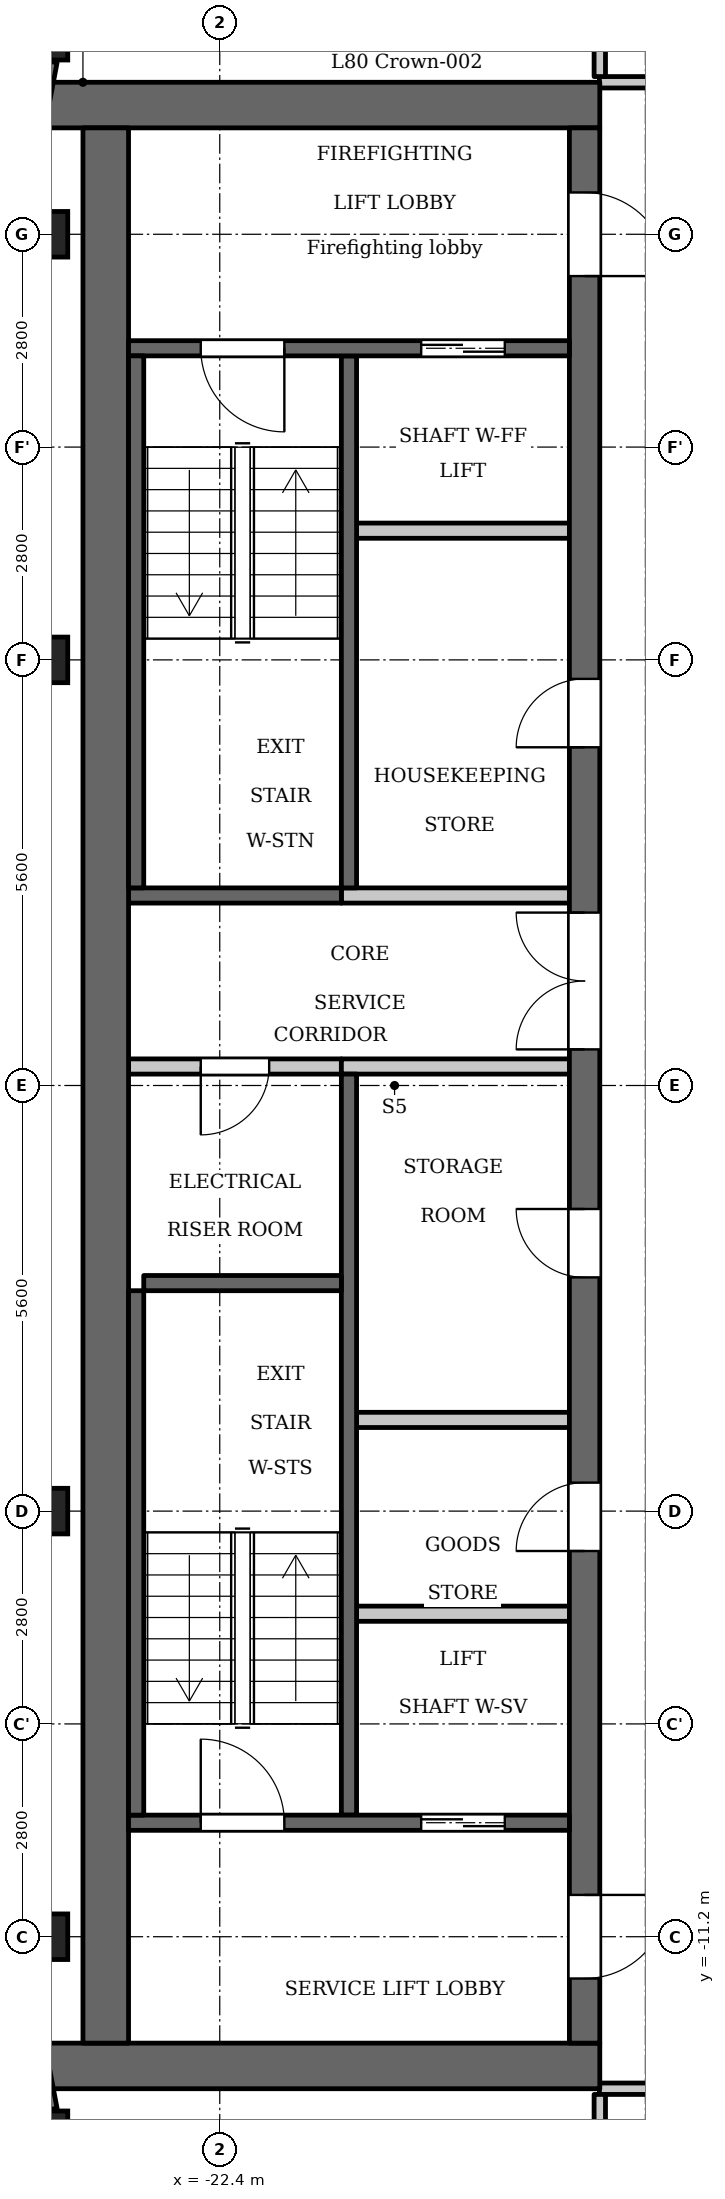
"""IFC4 building model, lengths in metres.
Left out: names, types, materials, properties, quantities, classifications, styles, units other than length and angle.
Written with IfcOpenShell. Run it as: python <this file> out.ifc"""

import sys

from ifc_helpers import new_model, si_unit, direction, frame, frame_2d, origin, origin_2d, place, context, subcontext, project, spatial, rectangle, extrude, element, fill, save


model = new_model("IFC4")
c1 = context("Model", 3, precision=1e-05, world=origin(), true_north=direction((0.0, 1.0)))
c2 = subcontext(c1, "Body", "Model", "MODEL_VIEW")
j1 = project(units=[si_unit("LENGTHUNIT", "METRE"), si_unit("PLANEANGLEUNIT", "RADIAN")], contexts=[c1])
p1 = place(None, origin())
s1 = spatial("IfcSite", under=j1, at=p1, CompositionType="ELEMENT")
p2 = place(p1, origin())
s2 = spatial("IfcBuilding", under=s1, at=p2, CompositionType="ELEMENT")
p3 = place(p2, frame((0.0, 0.0, 310.4)))
s3 = spatial("IfcBuildingStorey", under=s2, at=p3, CompositionType="ELEMENT", Elevation=310.4)
for number, where, z_axis, x_axis in (
    (1, (-24.7, -13.793, 0.0), (0.0, 0.0, 1.0), (1.0, 0.0, 0.0)),
    (2, (-24.7, -11.2, 0.0), (0.0, 0.0, 1.0), (1.0, 0.0, 0.0)),
    (3, (-24.7, -5.6, 0.0), (0.0, 0.0, 1.0), (1.0, 0.0, 0.0)),
    (4, (-24.7, 5.6, 0.0), (0.0, 0.0, 1.0), (1.0, 0.0, 0.0)),
    (5, (-24.7, 11.2, 0.0), (0.0, 0.0, 1.0), (1.0, 0.0, 0.0)),
    (6, (-24.7, 13.793, 0.0), (0.0, 0.0, 1.0), (1.0, 0.0, 0.0)),
):
    element("IfcColumn", number, at=place(p3, frame(where, z_axis=z_axis, x_axis=x_axis)), inside=s3, PredefinedType="COLUMN", context=c2, shape_type="SweptSolid", body=[
        extrude(rectangle(XDim=0.6, YDim=0.6, at=origin_2d()), origin(), (0.0, 0.0, 1.0), 3.5),
    ])
for number, where, z_axis, x_axis in (
    (7, (-24.688, 13.485, 0.0), (0.0, 0.0, 1.0), (-0.187, -0.982, 0.0)),
    (8, (-25.052, -11.573, 0.0), (0.0, 0.0, 1.0), (0.187, -0.982, 0.0)),
):
    element("IfcWall", number, at=place(p3, frame(where, z_axis=z_axis, x_axis=x_axis)), inside=s3, PredefinedType="SOLIDWALL", context=c2, shape_type="SweptSolid", body=[
        extrude(rectangle(XDim=1.947, YDim=0.3, at=frame_2d((0.973, 0.0))), origin(), (0.0, 0.0, 1.0), 2.2),
    ])
p4 = place(p3, frame((-20.7, 2.6, 0.0), z_axis=(0.0, 0.0, 1.0), x_axis=(0.0, 1.0, 0.0)))
e9 = element("IfcWall", 9, at=p4, inside=s3, PredefinedType="SHEAR", context=c2, shape_type="SweptSolid", body=[
    extrude(rectangle(XDim=7.0, YDim=0.2, at=frame_2d((3.5, 0.0))), origin(), (0.0, 0.0, 1.0), 2.8),
])
p5 = place(p3, frame((-20.7, -9.6, 0.0), z_axis=(0.0, 0.0, 1.0), x_axis=(0.0, 1.0, 0.0)))
e10 = element("IfcWall", 10, at=p5, inside=s3, PredefinedType="SHEAR", context=c2, shape_type="SweptSolid", body=[
    extrude(rectangle(XDim=9.75, YDim=0.2, at=frame_2d((4.875, 0.0))), origin(), (0.0, 0.0, 1.0), 2.8),
])
p6 = place(p3, frame((-20.8, 2.5, 0.0), z_axis=(0.0, 0.0, 1.0), x_axis=(-1.0, 0.0, 0.0)))
e11 = element("IfcWall", 11, at=p6, inside=s3, PredefinedType="SHEAR", context=c2, shape_type="SweptSolid", body=[
    extrude(rectangle(XDim=2.8, YDim=0.2, at=frame_2d((1.4, 0.0))), origin(), (0.0, 0.0, 1.0), 2.8),
])
p7 = place(p3, frame((-20.8, 0.25, 0.0), z_axis=(0.0, 0.0, 1.0), x_axis=(-1.0, 0.0, 0.0)))
e12 = element("IfcWall", 12, at=p7, inside=s3, PredefinedType="PARTITIONING", context=c2, shape_type="SweptSolid", body=[
    extrude(rectangle(XDim=2.8, YDim=0.2, at=frame_2d((1.4, 0.0))), origin(), (0.0, 0.0, 1.0), 2.8),
])
p8 = place(p7, frame((0.95, 0.0, 0.0)))
e13 = element("IfcOpeningElement", 13, at=p8, cuts=e12, PredefinedType="OPENING", context=c2, shape_type="SweptSolid", body=[
    extrude(rectangle(XDim=0.9, YDim=2.1, at=frame_2d((0.45, 1.05))), frame((0.0, 0.11, 0.0), z_axis=(0.0, -1.0, 0.0), x_axis=(1.0, 0.0, 0.0)), (0.0, 0.0, 1.0), 0.22),
])
for number, where, z_axis, x_axis in (
    (14, (-17.4, 12.9, 0.0), (0.0, 0.0, 1.0), (-1.0, 0.0, 0.0)),
    (15, (-17.4, -12.9, 0.0), (0.0, 0.0, 1.0), (-1.0, 0.0, 0.0)),
):
    element("IfcWall", number, at=place(p3, frame(where, z_axis=z_axis, x_axis=x_axis)), inside=s3, PredefinedType="SHEAR", context=c2, shape_type="SweptSolid", body=[
        extrude(rectangle(XDim=7.6, YDim=0.6, at=frame_2d((3.8, 0.0))), origin(), (0.0, 0.0, 1.0), 2.8),
    ])
p9 = place(p3, frame((-17.8, -4.4, 0.0), z_axis=(0.0, 0.0, 1.0), x_axis=(-1.0, 0.0, 0.0)))
e16 = element("IfcWall", 16, at=p9, inside=s3, PredefinedType="PARTITIONING", context=c2, shape_type="SweptSolid", body=[
    extrude(rectangle(XDim=2.8, YDim=0.2, at=frame_2d((1.4, 0.0))), origin(), (0.0, 0.0, 1.0), 2.8),
])
p10 = place(p3, frame((-17.6, -12.6, 0.0), z_axis=(0.0, 0.0, 1.0), x_axis=(0.0, 1.0, 0.0)))
e17 = element("IfcWall", 17, at=p10, inside=s3, PredefinedType="SHEAR", context=c2, shape_type="SweptSolid", body=[
    extrude(rectangle(XDim=25.2, YDim=0.4, at=frame_2d((12.6, 0.0))), origin(), (0.0, 0.0, 1.0), 2.8),
])
p11 = place(p10, frame((6.475, 0.0, 0.0)))
e18 = element("IfcOpeningElement", 18, at=p11, cuts=e17, PredefinedType="OPENING", context=c2, shape_type="SweptSolid", body=[
    extrude(rectangle(XDim=0.9, YDim=2.1, at=frame_2d((0.45, 1.05))), frame((0.0, 0.21, 0.0), z_axis=(0.0, -1.0, 0.0), x_axis=(1.0, 0.0, 0.0)), (0.0, 0.0, 1.0), 0.42),
])
p12 = place(p10, frame((10.075, 0.0, 0.0)))
e19 = element("IfcOpeningElement", 19, at=p12, cuts=e17, PredefinedType="OPENING", context=c2, shape_type="SweptSolid", body=[
    extrude(rectangle(XDim=0.9, YDim=2.1, at=frame_2d((0.45, 1.05))), frame((0.0, 0.21, 0.0), z_axis=(0.0, -1.0, 0.0), x_axis=(1.0, 0.0, 0.0)), (0.0, 0.0, 1.0), 0.42),
])
p13 = place(p10, frame((17.05, 0.0, 0.0)))
e20 = element("IfcOpeningElement", 20, at=p13, cuts=e17, PredefinedType="OPENING", context=c2, shape_type="SweptSolid", body=[
    extrude(rectangle(XDim=0.9, YDim=2.1, at=frame_2d((0.45, 1.05))), frame((0.0, 0.21, 0.0), z_axis=(0.0, -1.0, 0.0), x_axis=(1.0, 0.0, 0.0)), (0.0, 0.0, 1.0), 0.42),
])
p14 = place(p10, frame((23.25, 0.0, 0.0)))
e21 = element("IfcOpeningElement", 21, at=p14, cuts=e17, PredefinedType="OPENING", context=c2, shape_type="SweptSolid", body=[
    extrude(rectangle(XDim=1.1, YDim=2.1, at=frame_2d((0.55, 1.05))), frame((0.0, 0.21, 0.0), z_axis=(0.0, -1.0, 0.0), x_axis=(1.0, 0.0, 0.0)), (0.0, 0.0, 1.0), 0.42),
])
p15 = place(p10, frame((0.85, 0.0, 0.0)))
e22 = element("IfcOpeningElement", 22, at=p15, cuts=e17, PredefinedType="OPENING", context=c2, shape_type="SweptSolid", body=[
    extrude(rectangle(XDim=1.1, YDim=2.1, at=frame_2d((0.55, 1.05))), frame((0.0, 0.21, 0.0), z_axis=(0.0, -1.0, 0.0), x_axis=(1.0, 0.0, 0.0)), (0.0, 0.0, 1.0), 0.42),
])
p16 = place(p10, frame((13.075, 0.0, 0.0)))
e23 = element("IfcOpeningElement", 23, at=p16, cuts=e17, PredefinedType="OPENING", context=c2, shape_type="SweptSolid", body=[
    extrude(rectangle(XDim=1.8, YDim=2.1, at=frame_2d((0.9, 1.05))), frame((0.0, 0.21, 0.0), z_axis=(0.0, -1.0, 0.0), x_axis=(1.0, 0.0, 0.0)), (0.0, 0.0, 1.0), 0.42),
])
p17 = place(p3, frame((-23.9, -12.6, 0.0), z_axis=(0.0, 0.0, 1.0), x_axis=(0.0, 1.0, 0.0)))
e24 = element("IfcWall", 24, at=p17, inside=s3, PredefinedType="SHEAR", context=c2, shape_type="SweptSolid", body=[
    extrude(rectangle(XDim=25.2, YDim=0.6, at=frame_2d((12.6, 0.0))), origin(), (0.0, 0.0, 1.0), 2.8),
])
p18 = place(p3, frame((-17.8, -9.7, 0.0), z_axis=(0.0, 0.0, 1.0), x_axis=(-1.0, 0.0, 0.0)))
e25 = element("IfcWall", 25, at=p18, inside=s3, PredefinedType="SHEAR", context=c2, shape_type="SweptSolid", body=[
    extrude(rectangle(XDim=5.8, YDim=0.2, at=frame_2d((2.9, 0.0))), origin(), (0.0, 0.0, 1.0), 2.8),
])
p19 = place(p18, frame((0.85, 0.0, 0.0)))
e26 = element("IfcOpeningElement", 26, at=p19, cuts=e25, PredefinedType="OPENING", context=c2, shape_type="SweptSolid", body=[
    extrude(rectangle(XDim=1.1, YDim=2.1, at=frame_2d((0.55, 1.05))), frame((0.0, 0.11, 0.0), z_axis=(0.0, -1.0, 0.0), x_axis=(1.0, 0.0, 0.0)), (0.0, 0.0, 1.0), 0.22),
])
p20 = place(p18, frame((3.75, 0.0, 0.0)))
e27 = element("IfcOpeningElement", 27, at=p20, cuts=e25, PredefinedType="OPENING", context=c2, shape_type="SweptSolid", body=[
    extrude(rectangle(XDim=1.1, YDim=2.1, at=frame_2d((0.55, 1.05))), frame((0.0, 0.11, 0.0), z_axis=(0.0, -1.0, 0.0), x_axis=(1.0, 0.0, 0.0)), (0.0, 0.0, 1.0), 0.22),
])
p21 = place(p3, frame((-17.8, -6.95, 0.0), z_axis=(0.0, 0.0, 1.0), x_axis=(-1.0, 0.0, 0.0)))
e28 = element("IfcWall", 28, at=p21, inside=s3, PredefinedType="PARTITIONING", context=c2, shape_type="SweptSolid", body=[
    extrude(rectangle(XDim=2.8, YDim=0.2, at=frame_2d((1.4, 0.0))), origin(), (0.0, 0.0, 1.0), 2.8),
])
for number, where, z_axis, x_axis in (
    (29, (-17.8, 0.25, 0.0), (0.0, 0.0, 1.0), (-1.0, 0.0, 0.0)),
    (30, (-17.8, 2.5, 0.0), (0.0, 0.0, 1.0), (-1.0, 0.0, 0.0)),
):
    element("IfcWall", number, at=place(p3, frame(where, z_axis=z_axis, x_axis=x_axis)), inside=s3, PredefinedType="PARTITIONING", context=c2, shape_type="SweptSolid", body=[
        extrude(rectangle(XDim=3.0, YDim=0.2, at=frame_2d((1.5, 0.0))), origin(), (0.0, 0.0, 1.0), 2.8),
    ])
p22 = place(p3, frame((-17.8, 7.3, 0.0), z_axis=(0.0, 0.0, 1.0), x_axis=(-1.0, 0.0, 0.0)))
e31 = element("IfcWall", 31, at=p22, inside=s3, PredefinedType="PARTITIONING", context=c2, shape_type="SweptSolid", body=[
    extrude(rectangle(XDim=2.8, YDim=0.2, at=frame_2d((1.4, 0.0))), origin(), (0.0, 0.0, 1.0), 2.8),
])
p23 = place(p3, frame((-17.8, 9.7, 0.0), z_axis=(0.0, 0.0, 1.0), x_axis=(-1.0, 0.0, 0.0)))
e32 = element("IfcWall", 32, at=p23, inside=s3, PredefinedType="SHEAR", context=c2, shape_type="SweptSolid", body=[
    extrude(rectangle(XDim=5.8, YDim=0.2, at=frame_2d((2.9, 0.0))), origin(), (0.0, 0.0, 1.0), 2.8),
])
p24 = place(p23, frame((0.85, 0.0, 0.0)))
e33 = element("IfcOpeningElement", 33, at=p24, cuts=e32, PredefinedType="OPENING", context=c2, shape_type="SweptSolid", body=[
    extrude(rectangle(XDim=1.1, YDim=2.1, at=frame_2d((0.55, 1.05))), frame((0.0, 0.11, 0.0), z_axis=(0.0, -1.0, 0.0), x_axis=(1.0, 0.0, 0.0)), (0.0, 0.0, 1.0), 0.22),
])
p25 = place(p23, frame((3.75, 0.0, 0.0)))
e34 = element("IfcOpeningElement", 34, at=p25, cuts=e32, PredefinedType="OPENING", context=c2, shape_type="SweptSolid", body=[
    extrude(rectangle(XDim=1.1, YDim=2.1, at=frame_2d((0.55, 1.05))), frame((0.0, 0.11, 0.0), z_axis=(0.0, -1.0, 0.0), x_axis=(1.0, 0.0, 0.0)), (0.0, 0.0, 1.0), 0.22),
])
p26 = place(p3, frame((-23.5, 2.6, 0.0), z_axis=(0.0, 0.0, 1.0), x_axis=(0.0, 1.0, 0.0)))
e35 = element("IfcWall", 35, at=p26, inside=s3, PredefinedType="SHEAR", context=c2, shape_type="SweptSolid", body=[
    extrude(rectangle(XDim=7.0, YDim=0.2, at=frame_2d((3.5, 0.0))), origin(), (0.0, 0.0, 1.0), 2.8),
])
p27 = place(p3, frame((-23.5, -9.6, 0.0), z_axis=(0.0, 0.0, 1.0), x_axis=(0.0, 1.0, 0.0)))
e36 = element("IfcWall", 36, at=p27, inside=s3, PredefinedType="SHEAR", context=c2, shape_type="SweptSolid", body=[
    extrude(rectangle(XDim=6.9, YDim=0.2, at=frame_2d((3.45, 0.0))), origin(), (0.0, 0.0, 1.0), 2.8),
])
p28 = place(p3, frame((-20.8, -2.6, 0.0), z_axis=(0.0, 0.0, 1.0), x_axis=(-1.0, 0.0, 0.0)))
e37 = element("IfcWall", 37, at=p28, inside=s3, PredefinedType="SHEAR", context=c2, shape_type="SweptSolid", body=[
    extrude(rectangle(XDim=2.6, YDim=0.2, at=frame_2d((1.3, 0.0))), origin(), (0.0, 0.0, 1.0), 2.8),
])
p29 = place(p3, frame((-17.405, -13.2, 0.0), z_axis=(0.0, 0.0, 1.0), x_axis=(1.0, 0.0, 0.0)))
e38 = element("IfcWall", 38, at=p29, inside=s3, PredefinedType="PARTITIONING", context=c2, shape_type="SweptSolid", body=[
    extrude(rectangle(XDim=2.085, YDim=0.15, at=frame_2d((1.042, 0.0))), origin(), (0.0, 0.0, 1.0), 2.8),
])
p30 = place(p29, frame((0.655, 0.0, 0.0)))
e39 = element("IfcOpeningElement", 39, at=p30, cuts=e38, PredefinedType="OPENING", context=c2, shape_type="SweptSolid", body=[
    extrude(rectangle(XDim=1.0, YDim=2.1, at=frame_2d((0.5, 1.05))), frame((0.0, 0.085, 0.0), z_axis=(0.0, -1.0, 0.0), x_axis=(1.0, 0.0, 0.0)), (0.0, 0.0, 1.0), 0.17),
])
p31 = place(p3, frame((-17.405, 13.2, 0.0), z_axis=(0.0, 0.0, 1.0), x_axis=(1.0, 0.0, 0.0)))
e40 = element("IfcWall", 40, at=p31, inside=s3, PredefinedType="PARTITIONING", context=c2, shape_type="SweptSolid", body=[
    extrude(rectangle(XDim=2.085, YDim=0.15, at=frame_2d((1.042, 0.0))), origin(), (0.0, 0.0, 1.0), 2.8),
])
p32 = place(p31, frame((0.665, 0.0, 0.0)))
e41 = element("IfcOpeningElement", 41, at=p32, cuts=e40, PredefinedType="OPENING", context=c2, shape_type="SweptSolid", body=[
    extrude(rectangle(XDim=1.0, YDim=2.1, at=frame_2d((0.5, 1.05))), frame((0.0, 0.085, 0.0), z_axis=(0.0, -1.0, 0.0), x_axis=(1.0, 0.0, 0.0)), (0.0, 0.0, 1.0), 0.17),
])
p33 = place(p3, frame((-17.4, -19.236, 0.0), z_axis=(0.0, 0.0, 1.0), x_axis=(0.0, 1.0, 0.0)))
e42 = element("IfcWall", 42, at=p33, inside=s3, PredefinedType="PARTITIONING", context=c2, shape_type="SweptSolid", body=[
    extrude(rectangle(XDim=5.961, YDim=0.15, at=frame_2d((2.981, 0.0))), origin(), (0.0, 0.0, 1.0), 2.8),
])
p34 = place(p33, frame((0.486, 0.0, 0.0)))
e43 = element("IfcOpeningElement", 43, at=p34, cuts=e42, PredefinedType="OPENING", context=c2, shape_type="SweptSolid", body=[
    extrude(rectangle(XDim=0.9, YDim=2.1, at=frame_2d((0.45, 1.05))), frame((0.0, 0.085, 0.0), z_axis=(0.0, -1.0, 0.0), x_axis=(1.0, 0.0, 0.0)), (0.0, 0.0, 1.0), 0.17),
])
p35 = place(p3, frame((-17.4, 13.275, 0.0), z_axis=(0.0, 0.0, 1.0), x_axis=(0.0, 1.0, 0.0)))
e44 = element("IfcWall", 44, at=p35, inside=s3, PredefinedType="PARTITIONING", context=c2, shape_type="SweptSolid", body=[
    extrude(rectangle(XDim=5.961, YDim=0.15, at=frame_2d((2.981, 0.0))), origin(), (0.0, 0.0, 1.0), 2.8),
])
p36 = place(p35, frame((1.145, 0.0, 0.0)))
e45 = element("IfcOpeningElement", 45, at=p36, cuts=e44, PredefinedType="OPENING", context=c2, shape_type="SweptSolid", body=[
    extrude(rectangle(XDim=0.9, YDim=2.1, at=frame_2d((0.45, 1.05))), frame((0.0, 0.085, 0.0), z_axis=(0.0, -1.0, 0.0), x_axis=(1.0, 0.0, 0.0)), (0.0, 0.0, 1.0), 0.17),
])
p37 = place(p19, origin())
e46 = element("IfcDoor", 46, at=p37, inside=s3, OperationType="DOUBLE_DOOR_SLIDING", PredefinedType="DOOR", context=c2, shape_type="SweptSolid", body=[
    extrude(rectangle(XDim=1.1, YDim=2.1, at=frame_2d((0.55, 1.05))), frame((0.0, 0.025, 0.0), z_axis=(0.0, -1.0, 0.0), x_axis=(1.0, 0.0, 0.0)), (0.0, 0.0, 1.0), 0.05),
])
fill(e26, e46)
p38 = place(p11, origin())
e47 = element("IfcDoor", 47, at=p38, inside=s3, OperationType="SINGLE_SWING_RIGHT", PredefinedType="DOOR", context=c2, shape_type="SweptSolid", body=[
    extrude(rectangle(XDim=0.9, YDim=2.1, at=frame_2d((0.45, 1.05))), frame((0.0, 0.025, 0.0), z_axis=(0.0, -1.0, 0.0), x_axis=(1.0, 0.0, 0.0)), (0.0, 0.0, 1.0), 0.05),
])
fill(e18, e47)
p39 = place(p12, origin())
e48 = element("IfcDoor", 48, at=p39, inside=s3, OperationType="SINGLE_SWING_LEFT", PredefinedType="DOOR", context=c2, shape_type="SweptSolid", body=[
    extrude(rectangle(XDim=0.9, YDim=2.1, at=frame_2d((0.45, 1.05))), frame((0.0, 0.025, 0.0), z_axis=(0.0, -1.0, 0.0), x_axis=(1.0, 0.0, 0.0)), (0.0, 0.0, 1.0), 0.05),
])
fill(e19, e48)
p40 = place(p13, origin())
e49 = element("IfcDoor", 49, at=p40, inside=s3, OperationType="SINGLE_SWING_RIGHT", PredefinedType="DOOR", context=c2, shape_type="SweptSolid", body=[
    extrude(rectangle(XDim=0.9, YDim=2.1, at=frame_2d((0.45, 1.05))), frame((0.0, 0.025, 0.0), z_axis=(0.0, -1.0, 0.0), x_axis=(1.0, 0.0, 0.0)), (0.0, 0.0, 1.0), 0.05),
])
fill(e20, e49)
p41 = place(p24, origin())
e50 = element("IfcDoor", 50, at=p41, inside=s3, OperationType="DOUBLE_DOOR_SLIDING", PredefinedType="DOOR", context=c2, shape_type="SweptSolid", body=[
    extrude(rectangle(XDim=1.1, YDim=2.1, at=frame_2d((0.55, 1.05))), frame((0.0, 0.025, 0.0), z_axis=(0.0, -1.0, 0.0), x_axis=(1.0, 0.0, 0.0)), (0.0, 0.0, 1.0), 0.05),
])
fill(e33, e50)
p42 = place(p14, origin())
e51 = element("IfcDoor", 51, at=p42, inside=s3, OperationType="SINGLE_SWING_LEFT", PredefinedType="DOOR", context=c2, shape_type="SweptSolid", body=[
    extrude(rectangle(XDim=1.1, YDim=2.1, at=frame_2d((0.55, 1.05))), frame((0.0, 0.025, 0.0), z_axis=(0.0, -1.0, 0.0), x_axis=(1.0, 0.0, 0.0)), (0.0, 0.0, 1.0), 0.05),
])
fill(e21, e51)
p43 = place(p15, origin())
e52 = element("IfcDoor", 52, at=p43, inside=s3, OperationType="SINGLE_SWING_RIGHT", PredefinedType="DOOR", context=c2, shape_type="SweptSolid", body=[
    extrude(rectangle(XDim=1.1, YDim=2.1, at=frame_2d((0.55, 1.05))), frame((0.0, 0.025, 0.0), z_axis=(0.0, -1.0, 0.0), x_axis=(1.0, 0.0, 0.0)), (0.0, 0.0, 1.0), 0.05),
])
fill(e22, e52)
p44 = place(p25, origin())
e53 = element("IfcDoor", 53, at=p44, inside=s3, OperationType="SINGLE_SWING_RIGHT", PredefinedType="DOOR", context=c2, shape_type="SweptSolid", body=[
    extrude(rectangle(XDim=1.1, YDim=2.1, at=frame_2d((0.55, 1.05))), frame((0.0, 0.025, 0.0), z_axis=(0.0, -1.0, 0.0), x_axis=(1.0, 0.0, 0.0)), (0.0, 0.0, 1.0), 0.05),
])
fill(e34, e53)
p45 = place(p20, origin())
e54 = element("IfcDoor", 54, at=p45, inside=s3, OperationType="SINGLE_SWING_RIGHT", PredefinedType="DOOR", context=c2, shape_type="SweptSolid", body=[
    extrude(rectangle(XDim=1.1, YDim=2.1, at=frame_2d((0.55, 1.05))), frame((0.0, 0.025, 0.0), z_axis=(0.0, -1.0, 0.0), x_axis=(1.0, 0.0, 0.0)), (0.0, 0.0, 1.0), 0.05),
])
fill(e27, e54)
p46 = place(p16, origin())
e55 = element("IfcDoor", 55, at=p46, inside=s3, OperationType="DOUBLE_DOOR_SINGLE_SWING", PredefinedType="DOOR", context=c2, shape_type="SweptSolid", body=[
    extrude(rectangle(XDim=1.8, YDim=2.1, at=frame_2d((0.9, 1.05))), frame((0.0, 0.025, 0.0), z_axis=(0.0, -1.0, 0.0), x_axis=(1.0, 0.0, 0.0)), (0.0, 0.0, 1.0), 0.05),
])
fill(e23, e55)
p47 = place(p8, origin())
e56 = element("IfcDoor", 56, at=p47, inside=s3, OperationType="SINGLE_SWING_LEFT", PredefinedType="DOOR", context=c2, shape_type="SweptSolid", body=[
    extrude(rectangle(XDim=0.9, YDim=2.1, at=frame_2d((0.45, 1.05))), frame((0.0, 0.025, 0.0), z_axis=(0.0, -1.0, 0.0), x_axis=(1.0, 0.0, 0.0)), (0.0, 0.0, 1.0), 0.05),
])
fill(e13, e56)
save(model, sys.argv[1])
